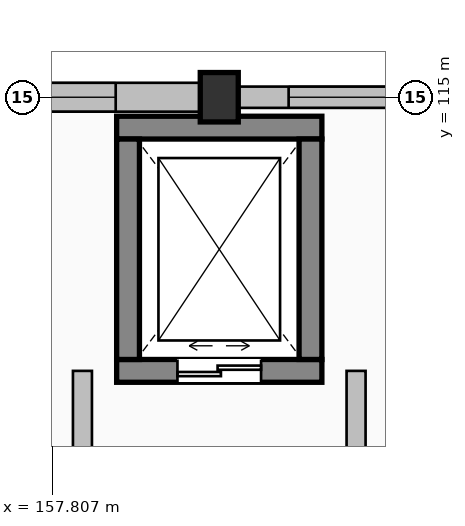
"""IFC4 building model, lengths in metres.
Left out: names, types, materials, properties, quantities, classifications, styles, units other than length and angle.
Written with IfcOpenShell. Run it as: python <this file> out.ifc"""

import sys

from ifc_helpers import new_model, si_unit, direction, frame, frame_2d, origin, origin_2d, place, context, subcontext, project, spatial, rectangle, extrude, element, fill, save


model = new_model("IFC4")
c1 = context("Model", 3, precision=1e-05, world=origin(), true_north=direction((0.0, 1.0)))
c2 = subcontext(c1, "Body", "Model", "MODEL_VIEW")
j1 = project(units=[si_unit("LENGTHUNIT", "METRE"), si_unit("PLANEANGLEUNIT", "RADIAN")], contexts=[c1])
p1 = place(None, origin())
s1 = spatial("IfcSite", under=j1, at=p1, CompositionType="ELEMENT")
p2 = place(p1, origin())
s2 = spatial("IfcBuilding", under=s1, at=p2, CompositionType="ELEMENT")
p3 = place(p2, frame((0.0, 0.0, 13.8)))
s3 = spatial("IfcBuildingStorey", under=s2, at=p3, CompositionType="ELEMENT", Elevation=13.8)
p4 = place(p3, frame((160.0, 115.0, 0.0), z_axis=(0.0, 0.0, 1.0), x_axis=(1.0, 0.0, 0.0)))
e1 = element("IfcColumn", 1, at=p4, inside=s3, PredefinedType="PILASTER", context=c2, shape_type="SweptSolid", body=[
    extrude(rectangle(XDim=0.5, YDim=0.65, at=origin_2d()), origin(), (0.0, 0.0, 1.0), 4.5),
])
p5 = place(p3, frame((156.325, 115.0, 0.0), z_axis=(0.0, 0.0, 1.0), x_axis=(1.0, 0.0, 0.0)))
e2 = element("IfcWall", 2, at=p5, inside=s3, PredefinedType="SOLIDWALL", context=c2, shape_type="SweptSolid", body=[
    extrude(rectangle(XDim=3.425, YDim=0.38, at=frame_2d((1.712, 0.0))), origin(), (0.0, 0.0, 1.0), 3.755),
])
p6 = place(p5, frame((1.113, 0.0, 0.95)))
e3 = element("IfcOpeningElement", 3, at=p6, cuts=e2, PredefinedType="OPENING", context=c2, shape_type="SweptSolid", body=[
    extrude(rectangle(XDim=1.2, YDim=1.5, at=frame_2d((0.6, 0.75))), frame((0.0, 0.2, 0.0), z_axis=(0.0, -1.0, 0.0), x_axis=(1.0, 0.0, 0.0)), (0.0, 0.0, 1.0), 0.4),
])
p7 = place(p3, frame((160.25, 115.0, 0.0), z_axis=(0.0, 0.0, 1.0), x_axis=(1.0, 0.0, 0.0)))
e4 = element("IfcWall", 4, at=p7, inside=s3, PredefinedType="SOLIDWALL", context=c2, shape_type="SweptSolid", body=[
    extrude(rectangle(XDim=3.425, YDim=0.28, at=frame_2d((1.712, 0.0))), origin(), (0.0, 0.0, 1.0), 3.755),
])
p8 = place(p7, frame((0.663, 0.0, 0.95)))
e5 = element("IfcOpeningElement", 5, at=p8, cuts=e4, PredefinedType="OPENING", context=c2, shape_type="SweptSolid", body=[
    extrude(rectangle(XDim=2.1, YDim=1.5, at=frame_2d((1.05, 0.75))), frame((0.0, 0.15, 0.0), z_axis=(0.0, -1.0, 0.0), x_axis=(1.0, 0.0, 0.0)), (0.0, 0.0, 1.0), 0.3),
])
p9 = place(p3, frame((158.65, 111.4, 0.0), z_axis=(0.0, 0.0, 1.0), x_axis=(1.0, 0.0, 0.0)))
e6 = element("IfcWall", 6, at=p9, inside=s3, PredefinedType="SHEAR", context=c2, shape_type="SweptSolid", body=[
    extrude(rectangle(XDim=2.7, YDim=0.3, at=frame_2d((1.35, 0.0))), origin(), (0.0, 0.0, 1.0), 4.27),
])
p10 = place(p9, frame((0.8, 0.0, 0.0)))
e7 = element("IfcOpeningElement", 7, at=p10, cuts=e6, PredefinedType="OPENING", context=c2, shape_type="SweptSolid", body=[
    extrude(rectangle(XDim=1.1, YDim=2.15, at=frame_2d((0.55, 1.075))), frame((0.0, 0.16, 0.0), z_axis=(0.0, -1.0, 0.0), x_axis=(1.0, 0.0, 0.0)), (0.0, 0.0, 1.0), 0.32),
])
p11 = place(p3, frame((161.35, 114.6, 0.0), z_axis=(0.0, 0.0, 1.0), x_axis=(-1.0, 0.0, 0.0)))
e8 = element("IfcWall", 8, at=p11, inside=s3, PredefinedType="SHEAR", context=c2, shape_type="SweptSolid", body=[
    extrude(rectangle(XDim=2.7, YDim=0.3, at=frame_2d((1.35, 0.0))), origin(), (0.0, 0.0, 1.0), 4.27),
])
for number, where, z_axis, x_axis in (
    (9, (158.8, 111.55, 0.0), (0.0, 0.0, 1.0), (0.0, 1.0, 0.0)),
    (10, (161.2, 114.45, 0.0), (0.0, 0.0, 1.0), (0.0, -1.0, 0.0)),
):
    element("IfcWall", number, at=place(p3, frame(where, z_axis=z_axis, x_axis=x_axis)), inside=s3, PredefinedType="SHEAR", context=c2, shape_type="SweptSolid", body=[
        extrude(rectangle(XDim=2.9, YDim=0.3, at=frame_2d((1.45, 0.0))), origin(), (0.0, 0.0, 1.0), 4.27),
    ])
for number, where, z_axis, x_axis in (
    (11, (158.2, 107.8, 0.0), (0.0, 0.0, 1.0), (0.0, 1.0, 0.0)),
    (12, (161.8, 111.4, 0.0), (0.0, 0.0, 1.0), (0.0, -1.0, 0.0)),
):
    element("IfcWall", number, at=place(p3, frame(where, z_axis=z_axis, x_axis=x_axis)), inside=s3, PredefinedType="SOLIDWALL", context=c2, shape_type="SweptSolid", body=[
        extrude(rectangle(XDim=3.6, YDim=0.25, at=frame_2d((1.8, 0.0))), origin(), (0.0, 0.0, 1.0), 4.27),
    ])
p12 = place(p6, origin())
e13 = element("IfcWindow", 13, at=p12, inside=s3, PartitioningType="SINGLE_PANEL", PredefinedType="WINDOW", context=c2, shape_type="SweptSolid", body=[
    extrude(rectangle(XDim=1.2, YDim=1.5, at=frame_2d((0.6, 0.75))), frame((0.0, 0.03, 0.0), z_axis=(0.0, -1.0, 0.0), x_axis=(1.0, 0.0, 0.0)), (0.0, 0.0, 1.0), 0.06),
])
fill(e3, e13)
p13 = place(p8, origin())
e14 = element("IfcWindow", 14, at=p13, inside=s3, PartitioningType="TRIPLE_PANEL_VERTICAL", PredefinedType="WINDOW", context=c2, shape_type="SweptSolid", body=[
    extrude(rectangle(XDim=2.1, YDim=1.5, at=frame_2d((1.05, 0.75))), frame((0.0, 0.03, 0.0), z_axis=(0.0, -1.0, 0.0), x_axis=(1.0, 0.0, 0.0)), (0.0, 0.0, 1.0), 0.06),
])
fill(e5, e14)
p14 = place(p10, origin())
e15 = element("IfcDoor", 15, at=p14, inside=s3, OperationType="DOUBLE_DOOR_SLIDING", PredefinedType="DOOR", context=c2, shape_type="SweptSolid", body=[
    extrude(rectangle(XDim=1.1, YDim=2.15, at=frame_2d((0.55, 1.075))), frame((0.0, 0.025, 0.0), z_axis=(0.0, -1.0, 0.0), x_axis=(1.0, 0.0, 0.0)), (0.0, 0.0, 1.0), 0.05),
])
fill(e7, e15)
save(model, sys.argv[1])
